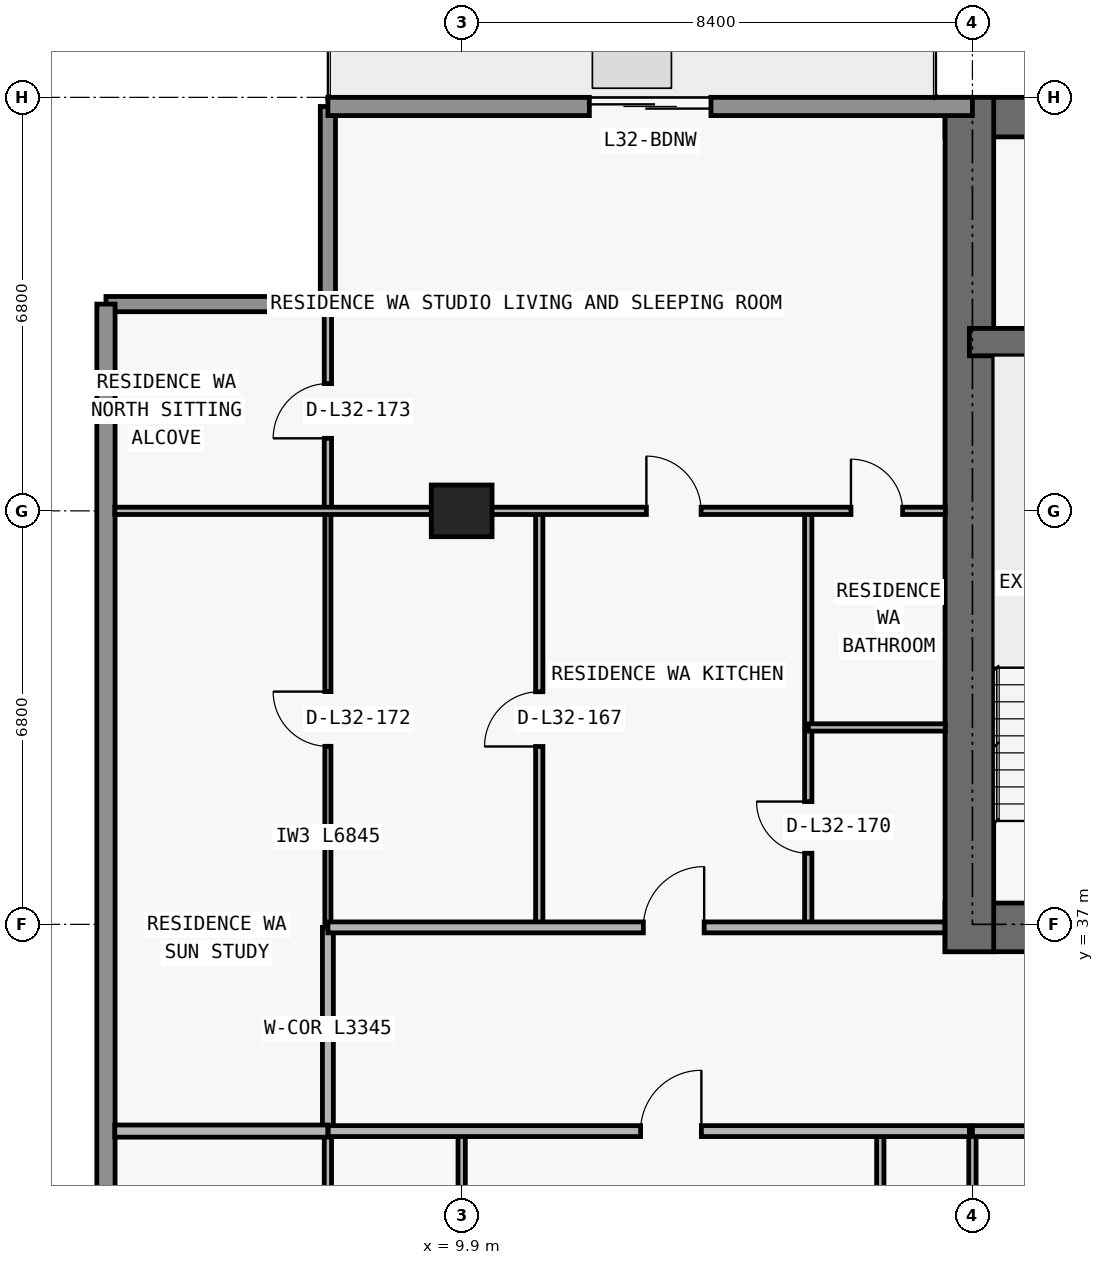
"""IFC4 building model, lengths in metres.
Left out: names, types, materials, properties, quantities, classifications, styles, units other than length and angle.
Written with IfcOpenShell. Run it as: python <this file> out.ifc"""

import sys

from ifc_helpers import new_model, si_unit, direction, frame, frame_2d, origin, origin_2d, place, context, subcontext, project, spatial, rectangle, extrude, element, fill, save


model = new_model("IFC4")
c1 = context("Model", 3, precision=1e-05, world=origin(), true_north=direction((0.0, 1.0)))
c2 = subcontext(c1, "Body", "Model", "MODEL_VIEW")
j1 = project(units=[si_unit("LENGTHUNIT", "METRE"), si_unit("PLANEANGLEUNIT", "RADIAN")], contexts=[c1])
p1 = place(None, origin())
s1 = spatial("IfcSite", under=j1, at=p1, CompositionType="ELEMENT")
p2 = place(p1, origin())
s2 = spatial("IfcBuilding", under=s1, at=p2, CompositionType="ELEMENT")
p3 = place(p2, frame((0.0, 0.0, 119.1)))
s3 = spatial("IfcBuildingStorey", under=s2, at=p3, CompositionType="ELEMENT", Elevation=119.1)
p4 = place(p3, frame((9.9, 43.8, 0.0), z_axis=(0.0, 0.0, 1.0), x_axis=(1.0, 0.0, 0.0)))
e1 = element("IfcColumn", 1, at=p4, inside=s3, PredefinedType="COLUMN", context=c2, shape_type="SweptSolid", body=[
    extrude(rectangle(XDim=1.0, YDim=0.85, at=origin_2d()), origin(), (0.0, 0.0, 1.0), 3.05),
])
p5 = place(p3, frame((17.85, 36.95, 0.0), z_axis=(0.0, 0.0, 1.0), x_axis=(1.0, 0.0, 0.0)))
e2 = element("IfcWall", 2, at=p5, inside=s3, PredefinedType="SHEAR", context=c2, shape_type="SweptSolid", body=[
    extrude(rectangle(XDim=42.1, YDim=0.8, at=frame_2d((21.05, 0.0))), origin(), (0.0, 0.0, 1.0), 3.05),
])
p6 = place(p5, frame((14.45, 0.0, 0.0)))
e3 = element("IfcOpeningElement", 3, at=p6, cuts=e2, PredefinedType="OPENING", context=c2, shape_type="SweptSolid", body=[
    extrude(rectangle(XDim=1.1, YDim=2.15, at=frame_2d((0.55, 1.075))), frame((0.0, 0.41, 0.0), z_axis=(0.0, -1.0, 0.0), x_axis=(1.0, 0.0, 0.0)), (0.0, 0.0, 1.0), 0.82),
])
p7 = place(p5, frame((6.3, 0.0, 0.0)))
e4 = element("IfcOpeningElement", 4, at=p7, cuts=e2, PredefinedType="OPENING", context=c2, shape_type="SweptSolid", body=[
    extrude(rectangle(XDim=1.05, YDim=2.15, at=frame_2d((0.525, 1.075))), frame((0.0, 0.41, 0.0), z_axis=(0.0, -1.0, 0.0), x_axis=(1.0, 0.0, 0.0)), (0.0, 0.0, 1.0), 0.82),
])
p8 = place(p5, frame((34.8, 0.0, 0.0)))
e5 = element("IfcOpeningElement", 5, at=p8, cuts=e2, PredefinedType="OPENING", context=c2, shape_type="SweptSolid", body=[
    extrude(rectangle(XDim=1.05, YDim=2.15, at=frame_2d((0.525, 1.075))), frame((0.0, 0.41, 0.0), z_axis=(0.0, -1.0, 0.0), x_axis=(1.0, 0.0, 0.0)), (0.0, 0.0, 1.0), 0.82),
])
p9 = place(p5, frame((10.913, 0.0, 0.0)))
e6 = element("IfcOpeningElement", 6, at=p9, cuts=e2, PredefinedType="OPENING", context=c2, shape_type="SweptSolid", body=[
    extrude(rectangle(XDim=1.05, YDim=2.15, at=frame_2d((0.525, 1.075))), frame((0.0, 0.41, 0.0), z_axis=(0.0, -1.0, 0.0), x_axis=(1.0, 0.0, 0.0)), (0.0, 0.0, 1.0), 0.82),
])
p10 = place(p5, frame((24.15, 0.0, 0.0)))
e7 = element("IfcOpeningElement", 7, at=p10, cuts=e2, PredefinedType="OPENING", context=c2, shape_type="SweptSolid", body=[
    extrude(rectangle(XDim=1.05, YDim=2.15, at=frame_2d((0.525, 1.075))), frame((0.0, 0.41, 0.0), z_axis=(0.0, -1.0, 0.0), x_axis=(1.0, 0.0, 0.0)), (0.0, 0.0, 1.0), 0.82),
])
p11 = place(p3, frame((17.85, 50.275, 0.0), z_axis=(0.0, 0.0, 1.0), x_axis=(1.0, 0.0, 0.0)))
e8 = element("IfcWall", 8, at=p11, inside=s3, PredefinedType="SHEAR", context=c2, shape_type="SweptSolid", body=[
    extrude(rectangle(XDim=42.1, YDim=0.65, at=frame_2d((21.05, 0.0))), origin(), (0.0, 0.0, 1.0), 3.05),
])
p12 = place(p3, frame((18.25, 36.55, 0.0), z_axis=(0.0, 0.0, 1.0), x_axis=(0.0, 1.0, 0.0)))
e9 = element("IfcWall", 9, at=p12, inside=s3, PredefinedType="SHEAR", context=c2, shape_type="SweptSolid", body=[
    extrude(rectangle(XDim=14.05, YDim=0.8, at=frame_2d((7.025, 0.0))), origin(), (0.0, 0.0, 1.0), 3.05),
])
p13 = place(p3, frame((18.25, 46.575, 0.0), z_axis=(0.0, 0.0, 1.0), x_axis=(1.0, 0.0, 0.0)))
e10 = element("IfcWall", 10, at=p13, inside=s3, PredefinedType="SHEAR", context=c2, shape_type="SweptSolid", body=[
    extrude(rectangle(XDim=41.3, YDim=0.45, at=frame_2d((20.65, 0.0))), origin(), (0.0, 0.0, 1.0), 3.05),
])
p14 = place(p13, frame((7.65, 0.0, 0.0)))
e11 = element("IfcOpeningElement", 11, at=p14, cuts=e10, PredefinedType="OPENING", context=c2, shape_type="SweptSolid", body=[
    extrude(rectangle(XDim=1.0, YDim=2.2, at=frame_2d((0.5, 1.1))), frame((0.0, 0.235, 0.0), z_axis=(0.0, -1.0, 0.0), x_axis=(1.0, 0.0, 0.0)), (0.0, 0.0, 1.0), 0.47),
])
p15 = place(p13, frame((32.675, 0.0, 0.0)))
e12 = element("IfcOpeningElement", 12, at=p15, cuts=e10, PredefinedType="OPENING", context=c2, shape_type="SweptSolid", body=[
    extrude(rectangle(XDim=1.05, YDim=2.15, at=frame_2d((0.525, 1.075))), frame((0.0, 0.235, 0.0), z_axis=(0.0, -1.0, 0.0), x_axis=(1.0, 0.0, 0.0)), (0.0, 0.0, 1.0), 0.47),
])
p16 = place(p3, frame((4.05, 47.2, 0.0), z_axis=(0.0, 0.0, 1.0), x_axis=(1.0, 0.0, 0.0)))
e13 = element("IfcWall", 13, at=p16, inside=s3, PredefinedType="ELEMENTEDWALL", context=c2, shape_type="SweptSolid", body=[
    extrude(rectangle(XDim=3.65, YDim=0.25, at=frame_2d((1.825, 0.0))), origin(), (0.0, 0.0, 1.0), 3.05),
])
p17 = place(p3, frame((7.7, 47.2, 0.0), z_axis=(0.0, 0.0, 1.0), x_axis=(0.0, 1.0, 0.0)))
e14 = element("IfcWall", 14, at=p17, inside=s3, PredefinedType="ELEMENTEDWALL", context=c2, shape_type="SweptSolid", body=[
    extrude(rectangle(XDim=3.25, YDim=0.25, at=frame_2d((1.625, 0.0))), origin(), (0.0, 0.0, 1.0), 3.05),
])
p18 = place(p3, frame((4.05, 28.0, 0.0), z_axis=(0.0, 0.0, 1.0), x_axis=(0.0, 1.0, 0.0)))
e15 = element("IfcWall", 15, at=p18, inside=s3, PredefinedType="STANDARD", context=c2, shape_type="SweptSolid", body=[
    extrude(rectangle(XDim=19.2, YDim=0.3, at=frame_2d((9.6, 0.0))), origin(), (0.0, 0.0, 1.0), 3.05),
])
p19 = place(p3, frame((7.7, 50.45, 0.0), z_axis=(0.0, 0.0, 1.0), x_axis=(1.0, 0.0, 0.0)))
e16 = element("IfcWall", 16, at=p19, inside=s3, PredefinedType="STANDARD", context=c2, shape_type="SweptSolid", body=[
    extrude(rectangle(XDim=10.6, YDim=0.3, at=frame_2d((5.3, 0.0))), origin(), (0.0, 0.0, 1.0), 3.05),
])
p20 = place(p19, frame((4.3, 0.0, 0.0)))
e17 = element("IfcOpeningElement", 17, at=p20, cuts=e16, PredefinedType="OPENING", context=c2, shape_type="SweptSolid", body=[
    extrude(rectangle(XDim=2.0, YDim=2.3, at=frame_2d((1.0, 1.15))), frame((0.0, 0.16, 0.0), z_axis=(0.0, -1.0, 0.0), x_axis=(1.0, 0.0, 0.0)), (0.0, 0.0, 1.0), 0.32),
])
p21 = place(p3, frame((7.7, 27.08, 0.0), z_axis=(0.0, 0.0, 1.0), x_axis=(0.0, 1.0, 0.0)))
e18 = element("IfcWall", 18, at=p21, inside=s3, PredefinedType="PARTITIONING", context=c2, shape_type="SweptSolid", body=[
    extrude(rectangle(XDim=6.52, YDim=0.12, at=frame_2d((3.26, 0.0))), origin(), (0.0, 0.0, 1.0), 3.05),
])
p22 = place(p3, frame((7.7, 33.605, 0.0), z_axis=(0.0, 0.0, 1.0), x_axis=(0.0, 1.0, 0.0)))
e19 = element("IfcWall", 19, at=p22, inside=s3, PredefinedType="PARTITIONING", context=c2, shape_type="SweptSolid", body=[
    extrude(rectangle(XDim=3.345, YDim=0.18, at=frame_2d((1.672, 0.0))), origin(), (0.0, 0.0, 1.0), 3.05),
])
p23 = place(p3, frame((7.7, 36.955, 0.0), z_axis=(0.0, 0.0, 1.0), x_axis=(0.0, 1.0, 0.0)))
e20 = element("IfcWall", 20, at=p23, inside=s3, PredefinedType="MOVABLE", context=c2, shape_type="SweptSolid", body=[
    extrude(rectangle(XDim=6.845, YDim=0.1, at=frame_2d((3.422, 0.0))), origin(), (0.0, 0.0, 1.0), 3.05),
])
p24 = place(p23, frame((2.972, 0.0, 0.0)))
e21 = element("IfcOpeningElement", 21, at=p24, cuts=e20, PredefinedType="OPENING", context=c2, shape_type="SweptSolid", body=[
    extrude(rectangle(XDim=0.9, YDim=2.15, at=frame_2d((0.45, 1.075))), frame((0.0, 0.06, 0.0), z_axis=(0.0, -1.0, 0.0), x_axis=(1.0, 0.0, 0.0)), (0.0, 0.0, 1.0), 0.12),
])
p25 = place(p3, frame((7.7, 43.805, 0.0), z_axis=(0.0, 0.0, 1.0), x_axis=(0.0, 1.0, 0.0)))
e22 = element("IfcWall", 22, at=p25, inside=s3, PredefinedType="PARTITIONING", context=c2, shape_type="SweptSolid", body=[
    extrude(rectangle(XDim=3.275, YDim=0.12, at=frame_2d((1.638, 0.0))), origin(), (0.0, 0.0, 1.0), 3.05),
])
p26 = place(p25, frame((1.188, 0.0, 0.0)))
e23 = element("IfcOpeningElement", 23, at=p26, cuts=e22, PredefinedType="OPENING", context=c2, shape_type="SweptSolid", body=[
    extrude(rectangle(XDim=0.9, YDim=2.15, at=frame_2d((0.45, 1.075))), frame((0.0, 0.07, 0.0), z_axis=(0.0, -1.0, 0.0), x_axis=(1.0, 0.0, 0.0)), (0.0, 0.0, 1.0), 0.14),
])
p27 = place(p3, frame((9.9, 27.08, 0.0), z_axis=(0.0, 0.0, 1.0), x_axis=(0.0, 1.0, 0.0)))
e24 = element("IfcWall", 24, at=p27, inside=s3, PredefinedType="PARTITIONING", context=c2, shape_type="SweptSolid", body=[
    extrude(rectangle(XDim=6.52, YDim=0.12, at=frame_2d((3.26, 0.0))), origin(), (0.0, 0.0, 1.0), 2.174),
])
p28 = place(p3, frame((11.176, 36.95, 0.0), z_axis=(0.0, 0.0, 1.0), x_axis=(0.0, 1.0, 0.0)))
e25 = element("IfcWall", 25, at=p28, inside=s3, PredefinedType="PARTITIONING", context=c2, shape_type="SweptSolid", body=[
    extrude(rectangle(XDim=6.85, YDim=0.12, at=frame_2d((3.425, 0.0))), origin(), (0.0, 0.0, 1.0), 3.05),
])
p29 = place(p28, frame((2.975, 0.0, 0.0)))
e26 = element("IfcOpeningElement", 26, at=p29, cuts=e25, PredefinedType="OPENING", context=c2, shape_type="SweptSolid", body=[
    extrude(rectangle(XDim=0.9, YDim=2.15, at=frame_2d((0.45, 1.075))), frame((0.0, 0.07, 0.0), z_axis=(0.0, -1.0, 0.0), x_axis=(1.0, 0.0, 0.0)), (0.0, 0.0, 1.0), 0.14),
])
p30 = place(p3, frame((15.6, 36.95, 0.0), z_axis=(0.0, 0.0, 1.0), x_axis=(0.0, 1.0, 0.0)))
e27 = element("IfcWall", 27, at=p30, inside=s3, PredefinedType="PARTITIONING", context=c2, shape_type="SweptSolid", body=[
    extrude(rectangle(XDim=6.85, YDim=0.12, at=frame_2d((3.425, 0.0))), origin(), (0.0, 0.0, 1.0), 2.578),
])
p31 = place(p30, frame((1.219, 0.0, 0.0)))
e28 = element("IfcOpeningElement", 28, at=p31, cuts=e27, PredefinedType="OPENING", context=c2, shape_type="SweptSolid", body=[
    extrude(rectangle(XDim=0.85, YDim=2.1, at=frame_2d((0.425, 1.05))), frame((0.0, 0.07, 0.0), z_axis=(0.0, -1.0, 0.0), x_axis=(1.0, 0.0, 0.0)), (0.0, 0.0, 1.0), 0.14),
])
p32 = place(p3, frame((16.785, 27.08, 0.0), z_axis=(0.0, 0.0, 1.0), x_axis=(0.0, 1.0, 0.0)))
e29 = element("IfcWall", 29, at=p32, inside=s3, PredefinedType="PARTITIONING", context=c2, shape_type="SweptSolid", body=[
    extrude(rectangle(XDim=6.52, YDim=0.12, at=frame_2d((3.26, 0.0))), origin(), (0.0, 0.0, 1.0), 3.05),
])
p33 = place(p32, frame((3.285, 0.0, 0.0)))
e30 = element("IfcOpeningElement", 30, at=p33, cuts=e29, PredefinedType="OPENING", context=c2, shape_type="SweptSolid", body=[
    extrude(rectangle(XDim=0.85, YDim=2.1, at=frame_2d((0.425, 1.05))), frame((0.0, 0.07, 0.0), z_axis=(0.0, -1.0, 0.0), x_axis=(1.0, 0.0, 0.0)), (0.0, 0.0, 1.0), 0.14),
])
p34 = place(p3, frame((18.3, 27.08, 0.0), z_axis=(0.0, 0.0, 1.0), x_axis=(0.0, 1.0, 0.0)))
e31 = element("IfcWall", 31, at=p34, inside=s3, PredefinedType="PARTITIONING", context=c2, shape_type="SweptSolid", body=[
    extrude(rectangle(XDim=6.52, YDim=0.12, at=frame_2d((3.26, 0.0))), origin(), (0.0, 0.0, 1.0), 2.174),
])
p35 = place(p3, frame((4.195, 33.6, 0.0), z_axis=(0.0, 0.0, 1.0), x_axis=(1.0, 0.0, 0.0)))
e32 = element("IfcWall", 32, at=p35, inside=s3, PredefinedType="PARTITIONING", context=c2, shape_type="SweptSolid", body=[
    extrude(rectangle(XDim=3.505, YDim=0.2, at=frame_2d((1.752, 0.0))), origin(), (0.0, 0.0, 1.0), 3.05),
])
p36 = place(p3, frame((7.705, 33.6, 0.0), z_axis=(0.0, 0.0, 1.0), x_axis=(1.0, 0.0, 0.0)))
e33 = element("IfcWall", 33, at=p36, inside=s3, PredefinedType="PARTITIONING", context=c2, shape_type="SweptSolid", body=[
    extrude(rectangle(XDim=10.545, YDim=0.18, at=frame_2d((5.272, 0.0))), origin(), (0.0, 0.0, 1.0), 3.05),
])
p37 = place(p36, frame((5.137, 0.0, 0.0)))
e34 = element("IfcOpeningElement", 34, at=p37, cuts=e33, PredefinedType="OPENING", context=c2, shape_type="SweptSolid", body=[
    extrude(rectangle(XDim=1.0, YDim=2.2, at=frame_2d((0.5, 1.1))), frame((0.0, 0.1, 0.0), z_axis=(0.0, -1.0, 0.0), x_axis=(1.0, 0.0, 0.0)), (0.0, 0.0, 1.0), 0.2),
])
p38 = place(p3, frame((18.3, 33.6, 0.0), z_axis=(0.0, 0.0, 1.0), x_axis=(1.0, 0.0, 0.0)))
e35 = element("IfcWall", 35, at=p38, inside=s3, PredefinedType="PARTITIONING", context=c2, shape_type="SweptSolid", body=[
    extrude(rectangle(XDim=41.2, YDim=0.18, at=frame_2d((20.6, 0.0))), origin(), (0.0, 0.0, 1.0), 3.05),
])
p39 = place(p38, frame((11.35, 0.0, 0.0)))
e36 = element("IfcOpeningElement", 36, at=p39, cuts=e35, PredefinedType="OPENING", context=c2, shape_type="SweptSolid", body=[
    extrude(rectangle(XDim=1.0, YDim=2.2, at=frame_2d((0.5, 1.1))), frame((0.0, 0.1, 0.0), z_axis=(0.0, -1.0, 0.0), x_axis=(1.0, 0.0, 0.0)), (0.0, 0.0, 1.0), 0.2),
])
p40 = place(p38, frame((27.275, 0.0, 0.0)))
e37 = element("IfcOpeningElement", 37, at=p40, cuts=e35, PredefinedType="OPENING", context=c2, shape_type="SweptSolid", body=[
    extrude(rectangle(XDim=1.0, YDim=2.2, at=frame_2d((0.5, 1.1))), frame((0.0, 0.1, 0.0), z_axis=(0.0, -1.0, 0.0), x_axis=(1.0, 0.0, 0.0)), (0.0, 0.0, 1.0), 0.2),
])
p41 = place(p38, frame((35.675, 0.0, 0.0)))
e38 = element("IfcOpeningElement", 38, at=p41, cuts=e35, PredefinedType="OPENING", context=c2, shape_type="SweptSolid", body=[
    extrude(rectangle(XDim=1.0, YDim=2.2, at=frame_2d((0.5, 1.1))), frame((0.0, 0.1, 0.0), z_axis=(0.0, -1.0, 0.0), x_axis=(1.0, 0.0, 0.0)), (0.0, 0.0, 1.0), 0.2),
])
p42 = place(p3, frame((7.7, 36.95, 0.0), z_axis=(0.0, 0.0, 1.0), x_axis=(1.0, 0.0, 0.0)))
e39 = element("IfcWall", 39, at=p42, inside=s3, PredefinedType="PARTITIONING", context=c2, shape_type="SweptSolid", body=[
    extrude(rectangle(XDim=10.145, YDim=0.18, at=frame_2d((5.073, 0.0))), origin(), (0.0, 0.0, 1.0), 3.05),
])
p43 = place(p42, frame((5.188, 0.0, 0.0)))
e40 = element("IfcOpeningElement", 40, at=p43, cuts=e39, PredefinedType="OPENING", context=c2, shape_type="SweptSolid", body=[
    extrude(rectangle(XDim=1.0, YDim=2.2, at=frame_2d((0.5, 1.1))), frame((0.0, 0.1, 0.0), z_axis=(0.0, -1.0, 0.0), x_axis=(1.0, 0.0, 0.0)), (0.0, 0.0, 1.0), 0.2),
])
p44 = place(p3, frame((15.6, 40.238, 0.0), z_axis=(0.0, 0.0, 1.0), x_axis=(1.0, 0.0, 0.0)))
e41 = element("IfcWall", 41, at=p44, inside=s3, PredefinedType="PARTITIONING", context=c2, shape_type="SweptSolid", body=[
    extrude(rectangle(XDim=2.255, YDim=0.12, at=frame_2d((1.127, 0.0))), origin(), (0.0, 0.0, 1.0), 3.05),
])
p45 = place(p3, frame((4.195, 43.8, 0.0), z_axis=(0.0, 0.0, 1.0), x_axis=(1.0, 0.0, 0.0)))
e42 = element("IfcWall", 42, at=p45, inside=s3, PredefinedType="PARTITIONING", context=c2, shape_type="SweptSolid", body=[
    extrude(rectangle(XDim=13.66, YDim=0.12, at=frame_2d((6.83, 0.0))), origin(), (0.0, 0.0, 1.0), 2.339),
])
p46 = place(p45, frame((8.743, 0.0, 0.0)))
e43 = element("IfcOpeningElement", 43, at=p46, cuts=e42, PredefinedType="OPENING", context=c2, shape_type="SweptSolid", body=[
    extrude(rectangle(XDim=0.9, YDim=2.15, at=frame_2d((0.45, 1.075))), frame((0.0, 0.07, 0.0), z_axis=(0.0, -1.0, 0.0), x_axis=(1.0, 0.0, 0.0)), (0.0, 0.0, 1.0), 0.14),
])
p47 = place(p45, frame((12.107, 0.0, 0.0)))
e44 = element("IfcOpeningElement", 44, at=p47, cuts=e42, PredefinedType="OPENING", context=c2, shape_type="SweptSolid", body=[
    extrude(rectangle(XDim=0.85, YDim=2.1, at=frame_2d((0.425, 1.05))), frame((0.0, 0.07, 0.0), z_axis=(0.0, -1.0, 0.0), x_axis=(1.0, 0.0, 0.0)), (0.0, 0.0, 1.0), 0.14),
])
p48 = place(p20, origin())
e45 = element("IfcDoor", 45, at=p48, inside=s3, OperationType="DOUBLE_DOOR_SLIDING", PredefinedType="DOOR", context=c2, shape_type="SweptSolid", body=[
    extrude(rectangle(XDim=2.0, YDim=2.3, at=frame_2d((1.0, 1.15))), frame((0.0, 0.025, 0.0), z_axis=(0.0, -1.0, 0.0), x_axis=(1.0, 0.0, 0.0)), (0.0, 0.0, 1.0), 0.05),
])
fill(e17, e45)
p49 = place(p37, origin())
e46 = element("IfcDoor", 46, at=p49, inside=s3, OperationType="SINGLE_SWING_RIGHT", PredefinedType="DOOR", context=c2, shape_type="SweptSolid", body=[
    extrude(rectangle(XDim=1.0, YDim=2.2, at=frame_2d((0.5, 1.1))), frame((0.0, 0.025, 0.0), z_axis=(0.0, -1.0, 0.0), x_axis=(1.0, 0.0, 0.0)), (0.0, 0.0, 1.0), 0.05),
])
fill(e34, e46)
p50 = place(p29, origin())
e47 = element("IfcDoor", 47, at=p50, inside=s3, OperationType="SINGLE_SWING_LEFT", PredefinedType="DOOR", context=c2, shape_type="SweptSolid", body=[
    extrude(rectangle(XDim=0.9, YDim=2.15, at=frame_2d((0.45, 1.075))), frame((0.0, 0.025, 0.0), z_axis=(0.0, -1.0, 0.0), x_axis=(1.0, 0.0, 0.0)), (0.0, 0.0, 1.0), 0.05),
])
fill(e26, e47)
p51 = place(p43, origin())
e48 = element("IfcDoor", 48, at=p51, inside=s3, OperationType="SINGLE_SWING_RIGHT", PredefinedType="DOOR", context=c2, shape_type="SweptSolid", body=[
    extrude(rectangle(XDim=1.0, YDim=2.2, at=frame_2d((0.5, 1.1))), frame((0.0, 0.025, 0.0), z_axis=(0.0, -1.0, 0.0), x_axis=(1.0, 0.0, 0.0)), (0.0, 0.0, 1.0), 0.05),
])
fill(e40, e48)
p52 = place(p46, origin())
e49 = element("IfcDoor", 49, at=p52, inside=s3, OperationType="SINGLE_SWING_LEFT", PredefinedType="DOOR", context=c2, shape_type="SweptSolid", body=[
    extrude(rectangle(XDim=0.9, YDim=2.15, at=frame_2d((0.45, 1.075))), frame((0.0, 0.025, 0.0), z_axis=(0.0, -1.0, 0.0), x_axis=(1.0, 0.0, 0.0)), (0.0, 0.0, 1.0), 0.05),
])
fill(e43, e49)
p53 = place(p31, origin())
e50 = element("IfcDoor", 50, at=p53, inside=s3, OperationType="SINGLE_SWING_RIGHT", PredefinedType="DOOR", context=c2, shape_type="SweptSolid", body=[
    extrude(rectangle(XDim=0.85, YDim=2.1, at=frame_2d((0.425, 1.05))), frame((0.0, 0.025, 0.0), z_axis=(0.0, -1.0, 0.0), x_axis=(1.0, 0.0, 0.0)), (0.0, 0.0, 1.0), 0.05),
])
fill(e28, e50)
p54 = place(p47, origin())
e51 = element("IfcDoor", 51, at=p54, inside=s3, OperationType="SINGLE_SWING_LEFT", PredefinedType="DOOR", context=c2, shape_type="SweptSolid", body=[
    extrude(rectangle(XDim=0.85, YDim=2.1, at=frame_2d((0.425, 1.05))), frame((0.0, 0.025, 0.0), z_axis=(0.0, -1.0, 0.0), x_axis=(1.0, 0.0, 0.0)), (0.0, 0.0, 1.0), 0.05),
])
fill(e44, e51)
p55 = place(p24, origin())
e52 = element("IfcDoor", 52, at=p55, inside=s3, OperationType="SINGLE_SWING_RIGHT", PredefinedType="DOOR", context=c2, shape_type="SweptSolid", body=[
    extrude(rectangle(XDim=0.9, YDim=2.15, at=frame_2d((0.45, 1.075))), frame((0.0, 0.025, 0.0), z_axis=(0.0, -1.0, 0.0), x_axis=(1.0, 0.0, 0.0)), (0.0, 0.0, 1.0), 0.05),
])
fill(e21, e52)
p56 = place(p26, origin())
e53 = element("IfcDoor", 53, at=p56, inside=s3, OperationType="SINGLE_SWING_LEFT", PredefinedType="DOOR", context=c2, shape_type="SweptSolid", body=[
    extrude(rectangle(XDim=0.9, YDim=2.15, at=frame_2d((0.45, 1.075))), frame((0.0, 0.025, 0.0), z_axis=(0.0, -1.0, 0.0), x_axis=(1.0, 0.0, 0.0)), (0.0, 0.0, 1.0), 0.05),
])
fill(e23, e53)
save(model, sys.argv[1])
